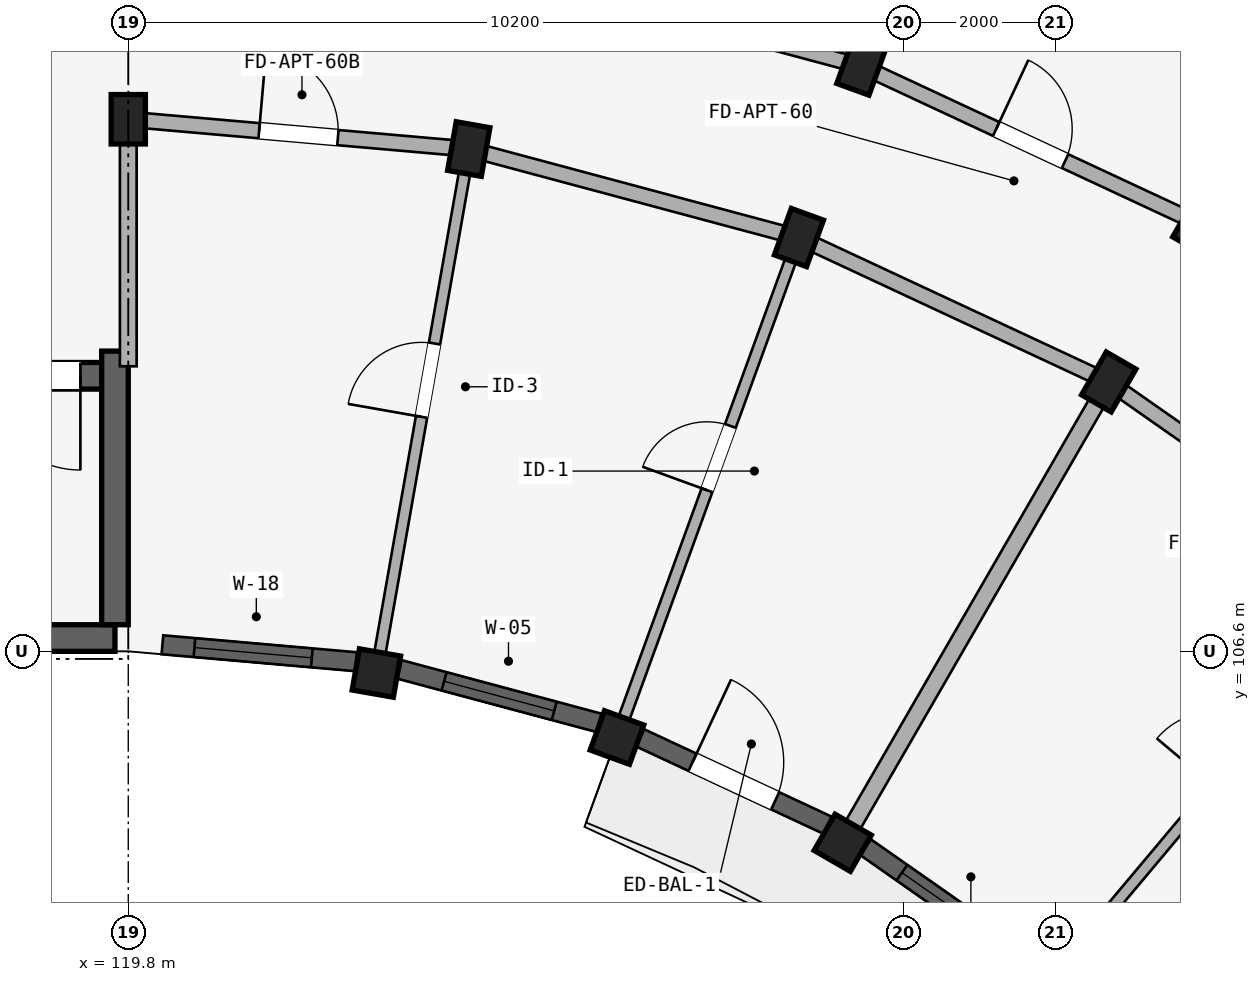
"""IFC4 building model, lengths in metres.
Left out: names, types, materials, properties, quantities, classifications, styles, units other than length and angle.
Written with IfcOpenShell. Run it as: python <this file> out.ifc"""

import sys

from ifc_helpers import new_model, si_unit, direction, frame, frame_2d, origin, origin_2d, place, context, subcontext, project, spatial, rectangle, extrude, element, fill, save


model = new_model("IFC4")
c1 = context("Model", 3, precision=1e-05, world=origin(), true_north=direction((0.0, 1.0)))
c2 = subcontext(c1, "Body", "Model", "MODEL_VIEW")
j1 = project(units=[si_unit("LENGTHUNIT", "METRE"), si_unit("PLANEANGLEUNIT", "RADIAN")], contexts=[c1])
p1 = place(None, origin())
s1 = spatial("IfcSite", under=j1, at=p1, CompositionType="ELEMENT")
p2 = place(p1, origin())
s2 = spatial("IfcBuilding", under=s1, at=p2, CompositionType="ELEMENT")
p3 = place(p2, frame((0.0, 0.0, 30.75)))
s3 = spatial("IfcBuildingStorey", under=s2, at=p3, CompositionType="ELEMENT", Elevation=30.75)
p4 = place(p3, frame((119.625, 106.775, 0.0), z_axis=(0.0, 0.0, 1.0), x_axis=(-1.0, 0.0, 0.0)))
e1 = element("IfcWall", 1, at=p4, inside=s3, PredefinedType="SHEAR", context=c2, shape_type="SweptSolid", body=[
    extrude(rectangle(XDim=8.25, YDim=0.35, at=frame_2d((4.125, 0.0))), origin(), (0.0, 0.0, 1.0), 2.93),
])
p5 = place(p3, frame((119.45, 110.225, 0.0), z_axis=(0.0, 0.0, 1.0), x_axis=(-1.0, 0.0, 0.0)))
e2 = element("IfcWall", 2, at=p5, inside=s3, PredefinedType="SHEAR", context=c2, shape_type="SweptSolid", body=[
    extrude(rectangle(XDim=7.9, YDim=0.35, at=frame_2d((3.95, 0.0))), origin(), (0.0, 0.0, 1.0), 2.93),
])
p6 = place(p5, frame((0.28, 0.0, 0.0)))
e3 = element("IfcOpeningElement", 3, at=p6, cuts=e2, PredefinedType="OPENING", context=c2, shape_type="SweptSolid", body=[
    extrude(rectangle(XDim=1.24, YDim=2.15, at=frame_2d((0.62, 1.075))), frame((0.0, 0.185, 0.0), z_axis=(0.0, -1.0, 0.0), x_axis=(1.0, 0.0, 0.0)), (0.0, 0.0, 1.0), 0.37),
])
p7 = place(p3, frame((119.625, 106.95, 0.0), z_axis=(0.0, 0.0, 1.0), x_axis=(0.0, 1.0, 0.0)))
e4 = element("IfcWall", 4, at=p7, inside=s3, PredefinedType="SHEAR", context=c2, shape_type="SweptSolid", body=[
    extrude(rectangle(XDim=3.6, YDim=0.35, at=frame_2d((1.8, 0.0))), origin(), (0.0, 0.0, 1.0), 2.93),
])
p8 = place(p3, frame((119.8, 113.6, 0.0), z_axis=(0.0, 0.0, 1.0), x_axis=(1.0, 0.0, 0.0)))
e5 = element("IfcColumn", 5, at=p8, inside=s3, PredefinedType="COLUMN", context=c2, shape_type="SweptSolid", body=[
    extrude(rectangle(XDim=0.45, YDim=0.65, at=origin_2d()), origin(), (0.0, 0.0, 1.0), 2.93),
])
p9 = place(p3, frame((123.065, 106.314, 0.0), z_axis=(0.0, 0.0, 1.0), x_axis=(-0.984807753012, 0.173648177667, 0.0)))
e6 = element("IfcColumn", 6, at=p9, inside=s3, PredefinedType="COLUMN", context=c2, shape_type="SweptSolid", body=[
    extrude(rectangle(XDim=0.55, YDim=0.55, at=origin_2d()), origin(), (0.0, 0.0, 1.0), 2.93),
])
p10 = place(p3, frame((124.28, 113.208, 0.0), z_axis=(0.0, 0.0, 1.0), x_axis=(-0.984807753012, 0.173648177667, 0.0)))
e7 = element("IfcColumn", 7, at=p10, inside=s3, PredefinedType="COLUMN", context=c2, shape_type="SweptSolid", body=[
    extrude(rectangle(XDim=0.45, YDim=0.65, at=origin_2d()), origin(), (0.0, 0.0, 1.0), 2.93),
])
p11 = place(p3, frame((126.23, 105.466, 0.0), z_axis=(0.0, 0.0, 1.0), x_axis=(-0.939692620786, 0.342020143326, 0.0)))
e8 = element("IfcColumn", 8, at=p11, inside=s3, PredefinedType="COLUMN", context=c2, shape_type="SweptSolid", body=[
    extrude(rectangle(XDim=0.55, YDim=0.55, at=origin_2d()), origin(), (0.0, 0.0, 1.0), 2.93),
])
for number, where, z_axis, x_axis in (
    (9, (128.624, 112.044, 0.0), (0.0, 0.0, 1.0), (-0.94, 0.342, 0.0)),
    (10, (129.445, 114.299, 0.0), (0.0, 0.0, 1.0), (-0.94, 0.342, 0.0)),
):
    element("IfcColumn", number, at=place(p3, frame(where, z_axis=z_axis, x_axis=x_axis)), inside=s3, PredefinedType="COLUMN", context=c2, shape_type="SweptSolid", body=[
        extrude(rectangle(XDim=0.45, YDim=0.65, at=origin_2d()), origin(), (0.0, 0.0, 1.0), 2.93),
    ])
p12 = place(p3, frame((129.2, 104.081, 0.0), z_axis=(0.0, 0.0, 1.0), x_axis=(-0.866025403784, 0.5, 0.0)))
e11 = element("IfcColumn", 11, at=p12, inside=s3, PredefinedType="COLUMN", context=c2, shape_type="SweptSolid", body=[
    extrude(rectangle(XDim=0.55, YDim=0.55, at=origin_2d()), origin(), (0.0, 0.0, 1.0), 2.93),
])
for number, where, z_axis, x_axis in (
    (12, (132.7, 110.144, 0.0), (0.0, 0.0, 1.0), (-0.866, 0.5, 0.0)),
    (13, (133.9, 112.222, 0.0), (0.0, 0.0, 1.0), (-0.866, 0.5, 0.0)),
):
    element("IfcColumn", number, at=place(p3, frame(where, z_axis=z_axis, x_axis=x_axis)), inside=s3, PredefinedType="COLUMN", context=c2, shape_type="SweptSolid", body=[
        extrude(rectangle(XDim=0.45, YDim=0.65, at=origin_2d()), origin(), (0.0, 0.0, 1.0), 2.93),
    ])
p13 = place(p3, frame((119.8, 113.6, 0.0), z_axis=(0.0, 0.0, 1.0), x_axis=(0.996191949488, -0.087187153726, 0.0)))
e14 = element("IfcWall", 14, at=p13, inside=s3, PredefinedType="STANDARD", context=c2, shape_type="SweptSolid", body=[
    extrude(rectangle(XDim=4.497, YDim=0.2, at=frame_2d((2.249, 0.0))), origin(), (0.0, 0.0, 1.0), 2.372),
])
p14 = place(p13, frame((1.729, 0.0, 0.0)))
e15 = element("IfcOpeningElement", 15, at=p14, cuts=e14, PredefinedType="OPENING", context=c2, shape_type="SweptSolid", body=[
    extrude(rectangle(XDim=1.04, YDim=2.15, at=frame_2d((0.52, 1.075))), frame((0.0, 0.11, 0.0), z_axis=(0.0, -1.0, 0.0), x_axis=(1.0, 0.0, 0.0)), (0.0, 0.0, 1.0), 0.22),
])
p15 = place(p3, frame((124.28, 113.208, 0.0), z_axis=(0.0, 0.0, 1.0), x_axis=(0.965934240054, -0.258787642463, 0.0)))
e16 = element("IfcWall", 16, at=p15, inside=s3, PredefinedType="STANDARD", context=c2, shape_type="SweptSolid", body=[
    extrude(rectangle(XDim=4.497, YDim=0.2, at=frame_2d((2.249, 0.0))), origin(), (0.0, 0.0, 1.0), 2.372),
])
p16 = place(p3, frame((124.697, 115.572, 0.0), z_axis=(0.0, 0.0, 1.0), x_axis=(0.965930095386, -0.258803112091, 0.0)))
e17 = element("IfcWall", 17, at=p16, inside=s3, PredefinedType="STANDARD", context=c2, shape_type="SweptSolid", body=[
    extrude(rectangle(XDim=4.916, YDim=0.2, at=frame_2d((2.458, 0.0))), origin(), (0.0, 0.0, 1.0), 2.372),
])
p17 = place(p3, frame((128.624, 112.044, 0.0), z_axis=(0.0, 0.0, 1.0), x_axis=(0.906307919131, -0.422617978463, 0.0)))
e18 = element("IfcWall", 18, at=p17, inside=s3, PredefinedType="STANDARD", context=c2, shape_type="SweptSolid", body=[
    extrude(rectangle(XDim=4.497, YDim=0.2, at=frame_2d((2.249, 0.0))), origin(), (0.0, 0.0, 1.0), 2.372),
])
p18 = place(p3, frame((129.445, 114.299, 0.0), z_axis=(0.0, 0.0, 1.0), x_axis=(0.906302381024, -0.422629854778, 0.0)))
e19 = element("IfcWall", 19, at=p18, inside=s3, PredefinedType="STANDARD", context=c2, shape_type="SweptSolid", body=[
    extrude(rectangle(XDim=4.915, YDim=0.2, at=frame_2d((2.458, 0.0))), origin(), (0.0, 0.0, 1.0), 2.372),
])
p19 = place(p18, frame((1.958, 0.0, 0.0)))
e20 = element("IfcOpeningElement", 20, at=p19, cuts=e19, PredefinedType="OPENING", context=c2, shape_type="SweptSolid", body=[
    extrude(rectangle(XDim=1.0, YDim=2.15, at=frame_2d((0.5, 1.075))), frame((0.0, 0.11, 0.0), z_axis=(0.0, -1.0, 0.0), x_axis=(1.0, 0.0, 0.0)), (0.0, 0.0, 1.0), 0.22),
])
p20 = place(p3, frame((132.7, 110.144, 0.0), z_axis=(0.0, 0.0, 1.0), x_axis=(0.819155404658, -0.573571637217, 0.0)))
e21 = element("IfcWall", 21, at=p20, inside=s3, PredefinedType="STANDARD", context=c2, shape_type="SweptSolid", body=[
    extrude(rectangle(XDim=4.497, YDim=0.2, at=frame_2d((2.249, 0.0))), origin(), (0.0, 0.0, 1.0), 2.372),
])
p21 = place(p20, frame((1.709, 0.0, 0.0)))
e22 = element("IfcOpeningElement", 22, at=p21, cuts=e21, PredefinedType="OPENING", context=c2, shape_type="SweptSolid", body=[
    extrude(rectangle(XDim=1.08, YDim=2.15, at=frame_2d((0.54, 1.075))), frame((0.0, 0.11, 0.0), z_axis=(0.0, -1.0, 0.0), x_axis=(1.0, 0.0, 0.0)), (0.0, 0.0, 1.0), 0.22),
])
p22 = place(p3, frame((119.8, 110.35, 0.0), z_axis=(0.0, 0.0, 1.0), x_axis=(0.0, 1.0, 0.0)))
e23 = element("IfcWall", 23, at=p22, inside=s3, PredefinedType="STANDARD", context=c2, shape_type="SweptSolid", body=[
    extrude(rectangle(XDim=3.2, YDim=0.22, at=frame_2d((1.6, 0.0))), origin(), (0.0, 0.0, 1.0), 2.372),
])
p23 = place(p3, frame((123.099, 106.511, 0.0), z_axis=(0.0, 0.0, 1.0), x_axis=(0.173647089161, 0.984807944945, 0.0)))
e24 = element("IfcWall", 24, at=p23, inside=s3, PredefinedType="PARTITIONING", context=c2, shape_type="SweptSolid", body=[
    extrude(rectangle(XDim=6.75, YDim=0.15, at=frame_2d((3.375, 0.0))), origin(), (0.0, 0.0, 1.0), 2.372),
])
p24 = place(p23, frame((3.222, 0.0, 0.0)))
e25 = element("IfcOpeningElement", 25, at=p24, cuts=e24, PredefinedType="OPENING", context=c2, shape_type="SweptSolid", body=[
    extrude(rectangle(XDim=0.98, YDim=2.12, at=frame_2d((0.49, 1.06))), frame((0.0, 0.085, 0.0), z_axis=(0.0, -1.0, 0.0), x_axis=(1.0, 0.0, 0.0)), (0.0, 0.0, 1.0), 0.17),
])
p25 = place(p3, frame((126.298, 105.654, 0.0), z_axis=(0.0, 0.0, 1.0), x_axis=(0.342010221662, 0.939696231917, 0.0)))
e26 = element("IfcWall", 26, at=p25, inside=s3, PredefinedType="PARTITIONING", context=c2, shape_type="SweptSolid", body=[
    extrude(rectangle(XDim=6.75, YDim=0.15, at=frame_2d((3.375, 0.0))), origin(), (0.0, 0.0, 1.0), 2.372),
])
p26 = place(p25, frame((3.262, 0.0, 0.0)))
e27 = element("IfcOpeningElement", 27, at=p26, cuts=e26, PredefinedType="OPENING", context=c2, shape_type="SweptSolid", body=[
    extrude(rectangle(XDim=0.9, YDim=2.1, at=frame_2d((0.45, 1.05))), frame((0.0, 0.085, 0.0), z_axis=(0.0, -1.0, 0.0), x_axis=(1.0, 0.0, 0.0)), (0.0, 0.0, 1.0), 0.17),
])
p27 = place(p3, frame((129.479, 114.393, 0.0), z_axis=(0.0, 0.0, 1.0), x_axis=(0.342015232663, 0.939694408106, 0.0)))
e28 = element("IfcWall", 28, at=p27, inside=s3, PredefinedType="STANDARD", context=c2, shape_type="SweptSolid", body=[
    extrude(rectangle(XDim=14.62, YDim=0.22, at=frame_2d((7.31, 0.0))), origin(), (0.0, 0.0, 1.0), 2.372),
])
p28 = place(p3, frame((129.3, 104.254, 0.0), z_axis=(0.0, 0.0, 1.0), x_axis=(0.499997969693, 0.866026575979, 0.0)))
e29 = element("IfcWall", 29, at=p28, inside=s3, PredefinedType="STANDARD", context=c2, shape_type="SweptSolid", body=[
    extrude(rectangle(XDim=6.75, YDim=0.22, at=frame_2d((3.375, 0.0))), origin(), (0.0, 0.0, 1.0), 2.372),
])
p29 = place(p3, frame((132.013, 102.355, 0.0), z_axis=(0.0, 0.0, 1.0), x_axis=(0.642784846501, 0.766046761698, 0.0)))
e30 = element("IfcWall", 30, at=p29, inside=s3, PredefinedType="PARTITIONING", context=c2, shape_type="SweptSolid", body=[
    extrude(rectangle(XDim=6.75, YDim=0.15, at=frame_2d((3.375, 0.0))), origin(), (0.0, 0.0, 1.0), 2.372),
])
p30 = place(p29, frame((3.222, 0.0, 0.0)))
e31 = element("IfcOpeningElement", 31, at=p30, cuts=e30, PredefinedType="OPENING", context=c2, shape_type="SweptSolid", body=[
    extrude(rectangle(XDim=0.98, YDim=2.12, at=frame_2d((0.49, 1.06))), frame((0.0, 0.085, 0.0), z_axis=(0.0, -1.0, 0.0), x_axis=(1.0, 0.0, 0.0)), (0.0, 0.0, 1.0), 0.17),
])
p31 = place(p3, frame((120.249, 106.686, 0.0), z_axis=(0.0, 0.0, 1.0), x_axis=(0.996188847542, -0.087222589008, 0.0)))
e32 = element("IfcWall", 32, at=p31, inside=s3, PredefinedType="STANDARD", context=c2, shape_type="SweptSolid", body=[
    extrude(rectangle(XDim=2.558, YDim=0.25, at=frame_2d((1.279, 0.0))), origin(), (0.0, 0.0, 1.0), 2.422),
])
p32 = place(p31, frame((0.424, 0.0, 0.622)))
e33 = element("IfcOpeningElement", 33, at=p32, cuts=e32, PredefinedType="OPENING", context=c2, shape_type="SweptSolid", body=[
    extrude(rectangle(XDim=1.55, YDim=1.6, at=frame_2d((0.775, 0.8))), frame((0.0, 0.135, 0.0), z_axis=(0.0, -1.0, 0.0), x_axis=(1.0, 0.0, 0.0)), (0.0, 0.0, 1.0), 0.27),
])
p33 = place(p3, frame((123.366, 106.363, 0.0), z_axis=(0.0, 0.0, 1.0), x_axis=(0.965928818058, -0.258807879411, 0.0)))
e34 = element("IfcWall", 34, at=p33, inside=s3, PredefinedType="STANDARD", context=c2, shape_type="SweptSolid", body=[
    extrude(rectangle(XDim=2.72, YDim=0.25, at=frame_2d((1.36, 0.0))), origin(), (0.0, 0.0, 1.0), 2.422),
])
p34 = place(p33, frame((0.61, 0.0, 0.572)))
e35 = element("IfcOpeningElement", 35, at=p34, cuts=e34, PredefinedType="OPENING", context=c2, shape_type="SweptSolid", body=[
    extrude(rectangle(XDim=1.5, YDim=1.65, at=frame_2d((0.75, 0.825))), frame((0.0, 0.135, 0.0), z_axis=(0.0, -1.0, 0.0), x_axis=(1.0, 0.0, 0.0)), (0.0, 0.0, 1.0), 0.27),
])
p35 = place(p3, frame((126.535, 105.462, 0.0), z_axis=(0.0, 0.0, 1.0), x_axis=(0.906302358412, -0.422629903269, 0.0)))
e36 = element("IfcWall", 36, at=p35, inside=s3, PredefinedType="STANDARD", context=c2, shape_type="SweptSolid", body=[
    extrude(rectangle(XDim=2.72, YDim=0.25, at=frame_2d((1.36, 0.0))), origin(), (0.0, 0.0, 1.0), 2.422),
])
p36 = place(p35, frame((0.76, 0.0, 0.0)))
e37 = element("IfcOpeningElement", 37, at=p36, cuts=e36, PredefinedType="OPENING", context=c2, shape_type="SweptSolid", body=[
    extrude(rectangle(XDim=1.2, YDim=2.15, at=frame_2d((0.6, 1.075))), frame((0.0, 0.135, 0.0), z_axis=(0.0, -1.0, 0.0), x_axis=(1.0, 0.0, 0.0)), (0.0, 0.0, 1.0), 0.27),
])
p37 = place(p3, frame((129.5, 104.024, 0.0), z_axis=(0.0, 0.0, 1.0), x_axis=(0.819126475299, -0.573612950921, 0.0)))
e38 = element("IfcWall", 38, at=p37, inside=s3, PredefinedType="STANDARD", context=c2, shape_type="SweptSolid", body=[
    extrude(rectangle(XDim=2.72, YDim=0.25, at=frame_2d((1.36, 0.0))), origin(), (0.0, 0.0, 1.0), 2.422),
])
p38 = place(p37, frame((0.585, 0.0, 0.622)))
e39 = element("IfcOpeningElement", 39, at=p38, cuts=e38, PredefinedType="OPENING", context=c2, shape_type="SweptSolid", body=[
    extrude(rectangle(XDim=1.55, YDim=1.6, at=frame_2d((0.775, 0.8))), frame((0.0, 0.135, 0.0), z_axis=(0.0, -1.0, 0.0), x_axis=(1.0, 0.0, 0.0)), (0.0, 0.0, 1.0), 0.27),
])
p39 = place(p32, origin())
e40 = element("IfcWindow", 40, at=p39, inside=s3, PartitioningType="DOUBLE_PANEL_VERTICAL", PredefinedType="WINDOW", context=c2, shape_type="SweptSolid", body=[
    extrude(rectangle(XDim=1.55, YDim=1.6, at=frame_2d((0.775, 0.8))), frame((0.0, 0.03, 0.0), z_axis=(0.0, -1.0, 0.0), x_axis=(1.0, 0.0, 0.0)), (0.0, 0.0, 1.0), 0.06),
])
fill(e33, e40)
p40 = place(p34, origin())
e41 = element("IfcWindow", 41, at=p40, inside=s3, PartitioningType="DOUBLE_PANEL_VERTICAL", PredefinedType="WINDOW", context=c2, shape_type="SweptSolid", body=[
    extrude(rectangle(XDim=1.5, YDim=1.65, at=frame_2d((0.75, 0.825))), frame((0.0, 0.03, 0.0), z_axis=(0.0, -1.0, 0.0), x_axis=(1.0, 0.0, 0.0)), (0.0, 0.0, 1.0), 0.06),
])
fill(e35, e41)
p41 = place(p38, origin())
e42 = element("IfcWindow", 42, at=p41, inside=s3, PartitioningType="DOUBLE_PANEL_VERTICAL", PredefinedType="WINDOW", context=c2, shape_type="SweptSolid", body=[
    extrude(rectangle(XDim=1.55, YDim=1.6, at=frame_2d((0.775, 0.8))), frame((0.0, 0.03, 0.0), z_axis=(0.0, -1.0, 0.0), x_axis=(1.0, 0.0, 0.0)), (0.0, 0.0, 1.0), 0.06),
])
fill(e39, e42)
p42 = place(p6, origin())
e43 = element("IfcDoor", 43, at=p42, inside=s3, OperationType="SINGLE_SWING_LEFT", PredefinedType="DOOR", context=c2, shape_type="SweptSolid", body=[
    extrude(rectangle(XDim=1.24, YDim=2.15, at=frame_2d((0.62, 1.075))), frame((0.0, 0.025, 0.0), z_axis=(0.0, -1.0, 0.0), x_axis=(1.0, 0.0, 0.0)), (0.0, 0.0, 1.0), 0.05),
])
fill(e3, e43)
p43 = place(p24, origin())
e44 = element("IfcDoor", 44, at=p43, inside=s3, OperationType="SINGLE_SWING_LEFT", PredefinedType="DOOR", context=c2, shape_type="SweptSolid", body=[
    extrude(rectangle(XDim=0.98, YDim=2.12, at=frame_2d((0.49, 1.06))), frame((0.0, 0.025, 0.0), z_axis=(0.0, -1.0, 0.0), x_axis=(1.0, 0.0, 0.0)), (0.0, 0.0, 1.0), 0.05),
])
fill(e25, e44)
p44 = place(p26, origin())
e45 = element("IfcDoor", 45, at=p44, inside=s3, OperationType="SINGLE_SWING_LEFT", PredefinedType="DOOR", context=c2, shape_type="SweptSolid", body=[
    extrude(rectangle(XDim=0.9, YDim=2.1, at=frame_2d((0.45, 1.05))), frame((0.0, 0.025, 0.0), z_axis=(0.0, -1.0, 0.0), x_axis=(1.0, 0.0, 0.0)), (0.0, 0.0, 1.0), 0.05),
])
fill(e27, e45)
p45 = place(p19, origin())
e46 = element("IfcDoor", 46, at=p45, inside=s3, OperationType="SINGLE_SWING_LEFT", PredefinedType="DOOR", context=c2, shape_type="SweptSolid", body=[
    extrude(rectangle(XDim=1.0, YDim=2.15, at=frame_2d((0.5, 1.075))), frame((0.0, 0.025, 0.0), z_axis=(0.0, -1.0, 0.0), x_axis=(1.0, 0.0, 0.0)), (0.0, 0.0, 1.0), 0.05),
])
fill(e20, e46)
p46 = place(p14, frame((1.04, 0.0, 0.0), z_axis=(0.0, 0.0, 1.0), x_axis=(-1.0, 0.0, 0.0)))
e47 = element("IfcDoor", 47, at=p46, inside=s3, OperationType="SINGLE_SWING_RIGHT", PredefinedType="DOOR", context=c2, shape_type="SweptSolid", body=[
    extrude(rectangle(XDim=1.04, YDim=2.15, at=frame_2d((0.52, 1.075))), frame((0.0, 0.025, 0.0), z_axis=(0.0, -1.0, 0.0), x_axis=(1.0, 0.0, 0.0)), (0.0, 0.0, 1.0), 0.05),
])
fill(e15, e47)
p47 = place(p36, frame((1.2, 0.0, 0.0), z_axis=(0.0, 0.0, 1.0), x_axis=(-1.0, 0.0, 0.0)))
e48 = element("IfcDoor", 48, at=p47, inside=s3, OperationType="SINGLE_SWING_RIGHT", PredefinedType="DOOR", context=c2, shape_type="SweptSolid", body=[
    extrude(rectangle(XDim=1.2, YDim=2.15, at=frame_2d((0.6, 1.075))), frame((0.0, 0.025, 0.0), z_axis=(0.0, -1.0, 0.0), x_axis=(1.0, 0.0, 0.0)), (0.0, 0.0, 1.0), 0.05),
])
fill(e37, e48)
save(model, sys.argv[1])
